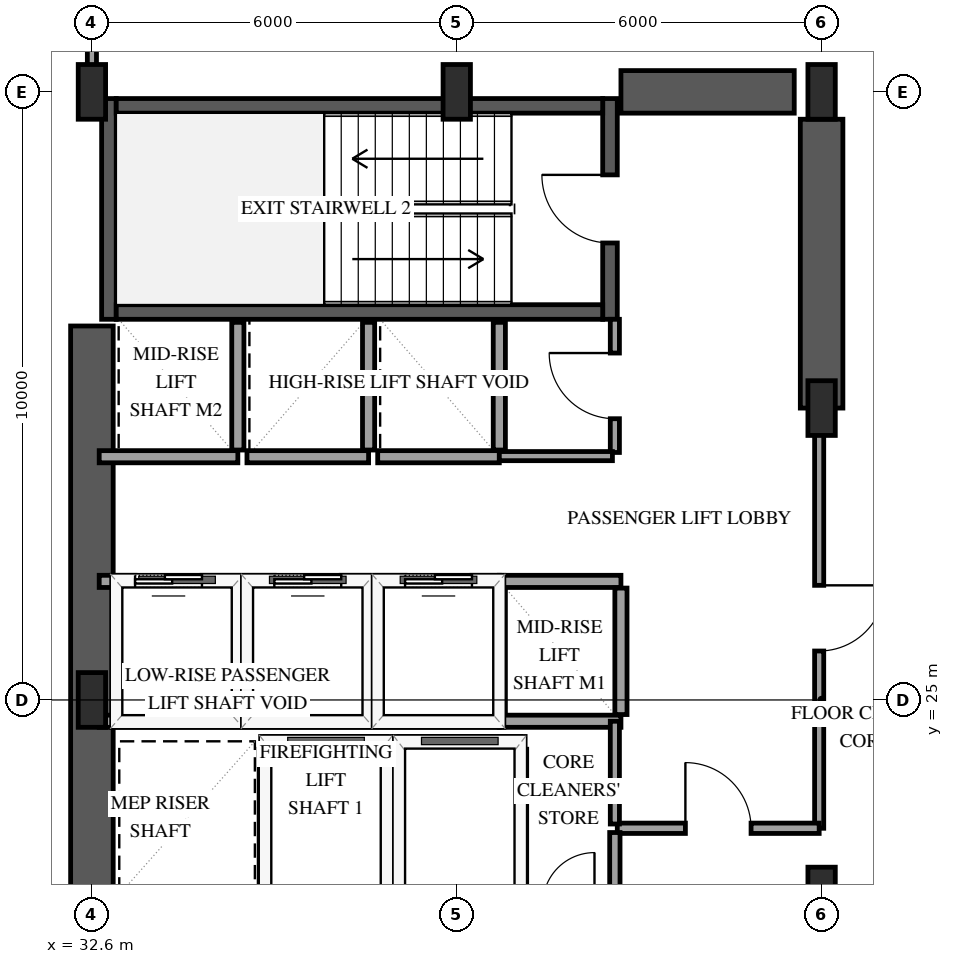
"""IFC4 building model, lengths in metres.
Left out: names, types, materials, properties, quantities, classifications, styles, units other than length and angle.
Written with IfcOpenShell. Run it as: python <this file> out.ifc"""

import sys

from ifc_helpers import new_model, si_unit, direction, frame, frame_2d, origin, origin_2d, place, context, subcontext, project, spatial, rectangle, extrude, element, fill, save


model = new_model("IFC4")
c1 = context("Model", 3, precision=1e-05, world=origin(), true_north=direction((0.0, 1.0)))
c2 = subcontext(c1, "Body", "Model", "MODEL_VIEW")
j1 = project(units=[si_unit("LENGTHUNIT", "METRE"), si_unit("PLANEANGLEUNIT", "RADIAN")], contexts=[c1])
p1 = place(None, origin())
s1 = spatial("IfcSite", under=j1, at=p1, CompositionType="ELEMENT")
p2 = place(p1, origin())
s2 = spatial("IfcBuilding", under=s1, at=p2, CompositionType="ELEMENT")
p3 = place(p2, frame((0.0, 0.0, 54.6)))
s3 = spatial("IfcBuildingStorey", under=s2, at=p3, CompositionType="ELEMENT", Elevation=54.6)
p4 = place(p3, frame((32.88, 31.26, 0.0), z_axis=(0.0, 0.0, 1.0), x_axis=(0.0, 1.0, 0.0)))
e1 = element("IfcWall", 1, at=p4, inside=s3, PredefinedType="SHEAR", context=c2, shape_type="SweptSolid", body=[
    extrude(rectangle(XDim=3.63, YDim=0.24, at=frame_2d((1.815, 0.0))), origin(), (0.0, 0.0, 1.0), 4.0),
])
p5 = place(p3, frame((41.12, 31.26, 0.0), z_axis=(0.0, 0.0, 1.0), x_axis=(0.0, 1.0, 0.0)))
e2 = element("IfcWall", 2, at=p5, inside=s3, PredefinedType="SHEAR", context=c2, shape_type="SweptSolid", body=[
    extrude(rectangle(XDim=3.63, YDim=0.24, at=frame_2d((1.815, 0.0))), origin(), (0.0, 0.0, 1.0), 4.0),
])
p6 = place(p5, frame((1.255, 0.0, 0.0)))
e3 = element("IfcOpeningElement", 3, at=p6, cuts=e2, PredefinedType="OPENING", context=c2, shape_type="SweptSolid", body=[
    extrude(rectangle(XDim=1.12, YDim=2.15, at=frame_2d((0.56, 1.075))), frame((0.0, 0.13, 0.0), z_axis=(0.0, -1.0, 0.0), x_axis=(1.0, 0.0, 0.0)), (0.0, 0.0, 1.0), 0.26),
])
for number, where, z_axis, x_axis in (
    (4, (33.0, 31.38, 0.0), (0.0, 0.0, 1.0), (1.0, 0.0, 0.0)),
    (5, (33.0, 34.77, 0.0), (0.0, 0.0, 1.0), (1.0, 0.0, 0.0)),
):
    element("IfcWall", number, at=place(p3, frame(where, z_axis=z_axis, x_axis=x_axis)), inside=s3, PredefinedType="SHEAR", context=c2, shape_type="SweptSolid", body=[
        extrude(rectangle(XDim=8.0, YDim=0.24, at=frame_2d((4.0, 0.0))), origin(), (0.0, 0.0, 1.0), 4.0),
    ])
p7 = place(p3, frame((32.6, 18.85, 0.0), z_axis=(0.0, 0.0, 1.0), x_axis=(0.0, 1.0, 0.0)))
e6 = element("IfcWall", 6, at=p7, inside=s3, PredefinedType="SHEAR", context=c2, shape_type="SweptSolid", body=[
    extrude(rectangle(XDim=12.3, YDim=0.7, at=frame_2d((6.15, 0.0))), origin(), (0.0, 0.0, 1.0), 4.0),
])
p8 = place(p3, frame((41.3, 35.0, 0.0), z_axis=(0.0, 0.0, 1.0), x_axis=(1.0, 0.0, 0.0)))
e7 = element("IfcWall", 7, at=p8, inside=s3, PredefinedType="SHEAR", context=c2, shape_type="SweptSolid", body=[
    extrude(rectangle(XDim=2.85, YDim=0.7, at=frame_2d((1.425, 0.0))), origin(), (0.0, 0.0, 1.0), 4.0),
])
p9 = place(p3, frame((44.6, 29.8, 0.0), z_axis=(0.0, 0.0, 1.0), x_axis=(0.0, 1.0, 0.0)))
e8 = element("IfcWall", 8, at=p9, inside=s3, PredefinedType="SHEAR", context=c2, shape_type="SweptSolid", body=[
    extrude(rectangle(XDim=4.75, YDim=0.7, at=frame_2d((2.375, 0.0))), origin(), (0.0, 0.0, 1.0), 4.0),
])
for number, where, z_axis, x_axis in (
    (9, (32.6, 25.0, 0.0), (0.0, 0.0, 1.0), (1.0, 0.0, 0.0)),
    (10, (32.6, 35.0, 0.0), (0.0, 0.0, 1.0), (1.0, 0.0, 0.0)),
    (11, (38.6, 35.0, 0.0), (0.0, 0.0, 1.0), (1.0, 0.0, 0.0)),
    (12, (44.6, 21.8, 0.0), (0.0, 0.0, 1.0), (1.0, 0.0, 0.0)),
    (13, (44.6, 29.8, 0.0), (0.0, 0.0, 1.0), (1.0, 0.0, 0.0)),
    (14, (44.6, 35.0, 0.0), (0.0, 0.0, 1.0), (1.0, 0.0, 0.0)),
):
    element("IfcColumn", number, at=place(p3, frame(where, z_axis=z_axis, x_axis=x_axis)), inside=s3, PredefinedType="PILASTER", context=c2, shape_type="SweptSolid", body=[
        extrude(rectangle(XDim=0.45, YDim=0.9, at=origin_2d()), origin(), (0.0, 0.0, 1.0), 4.0),
    ])
p10 = place(p3, frame((35.45, 24.3, 0.0), z_axis=(0.0, 0.0, 1.0), x_axis=(1.0, 0.0, 0.0)))
e15 = element("IfcWall", 15, at=p10, inside=s3, PredefinedType="SOLIDWALL", context=c2, shape_type="SweptSolid", body=[
    extrude(rectangle(XDim=2.0, YDim=0.2, at=frame_2d((1.0, 0.0))), origin(), (0.0, 0.0, 1.0), 3.7),
])
for number, where, z_axis, x_axis in (
    (16, (35.45, 21.81, 0.0), (0.0, 0.0, 1.0), (0.0, 1.0, 0.0)),
    (17, (37.45, 21.81, 0.0), (0.0, 0.0, 1.0), (0.0, 1.0, 0.0)),
):
    element("IfcWall", number, at=place(p3, frame(where, z_axis=z_axis, x_axis=x_axis)), inside=s3, PredefinedType="SOLIDWALL", context=c2, shape_type="SweptSolid", body=[
        extrude(rectangle(XDim=2.38, YDim=0.2, at=frame_2d((1.19, 0.0))), origin(), (0.0, 0.0, 1.0), 3.7),
    ])
p11 = place(p3, frame((37.65, 24.3, 0.0), z_axis=(0.0, 0.0, 1.0), x_axis=(1.0, 0.0, 0.0)))
e18 = element("IfcWall", 18, at=p11, inside=s3, PredefinedType="SOLIDWALL", context=c2, shape_type="SweptSolid", body=[
    extrude(rectangle(XDim=2.0, YDim=0.2, at=frame_2d((1.0, 0.0))), origin(), (0.0, 0.0, 1.0), 3.7),
])
p12 = place(p3, frame((39.65, 21.81, 0.0), z_axis=(0.0, 0.0, 1.0), x_axis=(0.0, 1.0, 0.0)))
e19 = element("IfcWall", 19, at=p12, inside=s3, PredefinedType="SOLIDWALL", context=c2, shape_type="SweptSolid", body=[
    extrude(rectangle(XDim=2.38, YDim=0.2, at=frame_2d((1.19, 0.0))), origin(), (0.0, 0.0, 1.0), 3.7),
])
p13 = place(p3, frame((32.72, 24.65, 0.0), z_axis=(0.0, 0.0, 1.0), x_axis=(1.0, 0.0, 0.0)))
e20 = element("IfcWall", 20, at=p13, inside=s3, PredefinedType="SOLIDWALL", context=c2, shape_type="SweptSolid", body=[
    extrude(rectangle(XDim=2.28, YDim=0.2, at=frame_2d((1.14, 0.0))), origin(), (0.0, 0.0, 1.0), 3.7),
])
p14 = place(p3, frame((32.72, 26.95, 0.0), z_axis=(0.0, 0.0, 1.0), x_axis=(1.0, 0.0, 0.0)))
e21 = element("IfcWall", 21, at=p14, inside=s3, PredefinedType="SOLIDWALL", context=c2, shape_type="SweptSolid", body=[
    extrude(rectangle(XDim=2.28, YDim=0.2, at=frame_2d((1.14, 0.0))), origin(), (0.0, 0.0, 1.0), 3.7),
])
p15 = place(p14, frame((0.59, 0.0, 0.0)))
e22 = element("IfcOpeningElement", 22, at=p15, cuts=e21, PredefinedType="OPENING", context=c2, shape_type="SweptSolid", body=[
    extrude(rectangle(XDim=1.1, YDim=2.15, at=frame_2d((0.55, 1.075))), frame((0.0, 0.11, 0.0), z_axis=(0.0, -1.0, 0.0), x_axis=(1.0, 0.0, 0.0)), (0.0, 0.0, 1.0), 0.22),
])
p16 = place(p3, frame((35.0, 24.76, 0.0), z_axis=(0.0, 0.0, 1.0), x_axis=(0.0, 1.0, 0.0)))
e23 = element("IfcWall", 23, at=p16, inside=s3, PredefinedType="SOLIDWALL", context=c2, shape_type="SweptSolid", body=[
    extrude(rectangle(XDim=2.08, YDim=0.2, at=frame_2d((1.04, 0.0))), origin(), (0.0, 0.0, 1.0), 3.7),
])
p17 = place(p3, frame((35.15, 24.65, 0.0), z_axis=(0.0, 0.0, 1.0), x_axis=(1.0, 0.0, 0.0)))
e24 = element("IfcWall", 24, at=p17, inside=s3, PredefinedType="SOLIDWALL", context=c2, shape_type="SweptSolid", body=[
    extrude(rectangle(XDim=2.0, YDim=0.2, at=frame_2d((1.0, 0.0))), origin(), (0.0, 0.0, 1.0), 3.7),
])
p18 = place(p3, frame((35.15, 26.95, 0.0), z_axis=(0.0, 0.0, 1.0), x_axis=(1.0, 0.0, 0.0)))
e25 = element("IfcWall", 25, at=p18, inside=s3, PredefinedType="SOLIDWALL", context=c2, shape_type="SweptSolid", body=[
    extrude(rectangle(XDim=2.0, YDim=0.2, at=frame_2d((1.0, 0.0))), origin(), (0.0, 0.0, 1.0), 3.7),
])
p19 = place(p18, frame((0.45, 0.0, 0.0)))
e26 = element("IfcOpeningElement", 26, at=p19, cuts=e25, PredefinedType="OPENING", context=c2, shape_type="SweptSolid", body=[
    extrude(rectangle(XDim=1.1, YDim=2.15, at=frame_2d((0.55, 1.075))), frame((0.0, 0.11, 0.0), z_axis=(0.0, -1.0, 0.0), x_axis=(1.0, 0.0, 0.0)), (0.0, 0.0, 1.0), 0.22),
])
p20 = place(p3, frame((37.15, 24.76, 0.0), z_axis=(0.0, 0.0, 1.0), x_axis=(0.0, 1.0, 0.0)))
e27 = element("IfcWall", 27, at=p20, inside=s3, PredefinedType="SOLIDWALL", context=c2, shape_type="SweptSolid", body=[
    extrude(rectangle(XDim=2.08, YDim=0.2, at=frame_2d((1.04, 0.0))), origin(), (0.0, 0.0, 1.0), 3.7),
])
p21 = place(p3, frame((37.3, 24.65, 0.0), z_axis=(0.0, 0.0, 1.0), x_axis=(1.0, 0.0, 0.0)))
e28 = element("IfcWall", 28, at=p21, inside=s3, PredefinedType="SOLIDWALL", context=c2, shape_type="SweptSolid", body=[
    extrude(rectangle(XDim=2.0, YDim=0.2, at=frame_2d((1.0, 0.0))), origin(), (0.0, 0.0, 1.0), 3.7),
])
p22 = place(p3, frame((37.3, 26.95, 0.0), z_axis=(0.0, 0.0, 1.0), x_axis=(1.0, 0.0, 0.0)))
e29 = element("IfcWall", 29, at=p22, inside=s3, PredefinedType="SOLIDWALL", context=c2, shape_type="SweptSolid", body=[
    extrude(rectangle(XDim=2.0, YDim=0.2, at=frame_2d((1.0, 0.0))), origin(), (0.0, 0.0, 1.0), 3.7),
])
p23 = place(p22, frame((0.45, 0.0, 0.0)))
e30 = element("IfcOpeningElement", 30, at=p23, cuts=e29, PredefinedType="OPENING", context=c2, shape_type="SweptSolid", body=[
    extrude(rectangle(XDim=1.1, YDim=2.15, at=frame_2d((0.55, 1.075))), frame((0.0, 0.11, 0.0), z_axis=(0.0, -1.0, 0.0), x_axis=(1.0, 0.0, 0.0)), (0.0, 0.0, 1.0), 0.22),
])
p24 = place(p3, frame((39.3, 24.76, 0.0), z_axis=(0.0, 0.0, 1.0), x_axis=(0.0, 1.0, 0.0)))
e31 = element("IfcWall", 31, at=p24, inside=s3, PredefinedType="SOLIDWALL", context=c2, shape_type="SweptSolid", body=[
    extrude(rectangle(XDim=2.08, YDim=0.2, at=frame_2d((1.04, 0.0))), origin(), (0.0, 0.0, 1.0), 3.7),
])
for number, where, z_axis, x_axis in (
    (32, (39.3, 24.65, 0.0), (0.0, 0.0, 1.0), (1.0, 0.0, 0.0)),
    (33, (39.3, 26.95, 0.0), (0.0, 0.0, 1.0), (1.0, 0.0, 0.0)),
):
    element("IfcWall", number, at=place(p3, frame(where, z_axis=z_axis, x_axis=x_axis)), inside=s3, PredefinedType="SOLIDWALL", context=c2, shape_type="SweptSolid", body=[
        extrude(rectangle(XDim=2.0, YDim=0.2, at=frame_2d((1.0, 0.0))), origin(), (0.0, 0.0, 1.0), 3.7),
    ])
p25 = place(p3, frame((41.3, 24.76, 0.0), z_axis=(0.0, 0.0, 1.0), x_axis=(0.0, 1.0, 0.0)))
e34 = element("IfcWall", 34, at=p25, inside=s3, PredefinedType="SOLIDWALL", context=c2, shape_type="SweptSolid", body=[
    extrude(rectangle(XDim=2.08, YDim=0.2, at=frame_2d((1.04, 0.0))), origin(), (0.0, 0.0, 1.0), 3.7),
])
p26 = place(p3, frame((32.72, 29.0, 0.0), z_axis=(0.0, 0.0, 1.0), x_axis=(1.0, 0.0, 0.0)))
e35 = element("IfcWall", 35, at=p26, inside=s3, PredefinedType="SOLIDWALL", context=c2, shape_type="SweptSolid", body=[
    extrude(rectangle(XDim=2.28, YDim=0.2, at=frame_2d((1.14, 0.0))), origin(), (0.0, 0.0, 1.0), 3.7),
])
p27 = place(p3, frame((35.0, 29.11, 0.0), z_axis=(0.0, 0.0, 1.0), x_axis=(0.0, 1.0, 0.0)))
e36 = element("IfcWall", 36, at=p27, inside=s3, PredefinedType="SOLIDWALL", context=c2, shape_type="SweptSolid", body=[
    extrude(rectangle(XDim=2.1, YDim=0.2, at=frame_2d((1.05, 0.0))), origin(), (0.0, 0.0, 1.0), 3.7),
])
p28 = place(p3, frame((35.15, 29.0, 0.0), z_axis=(0.0, 0.0, 1.0), x_axis=(1.0, 0.0, 0.0)))
e37 = element("IfcWall", 37, at=p28, inside=s3, PredefinedType="SOLIDWALL", context=c2, shape_type="SweptSolid", body=[
    extrude(rectangle(XDim=2.0, YDim=0.2, at=frame_2d((1.0, 0.0))), origin(), (0.0, 0.0, 1.0), 3.7),
])
p29 = place(p3, frame((37.15, 29.11, 0.0), z_axis=(0.0, 0.0, 1.0), x_axis=(0.0, 1.0, 0.0)))
e38 = element("IfcWall", 38, at=p29, inside=s3, PredefinedType="SOLIDWALL", context=c2, shape_type="SweptSolid", body=[
    extrude(rectangle(XDim=2.1, YDim=0.2, at=frame_2d((1.05, 0.0))), origin(), (0.0, 0.0, 1.0), 3.7),
])
p30 = place(p3, frame((37.3, 29.0, 0.0), z_axis=(0.0, 0.0, 1.0), x_axis=(1.0, 0.0, 0.0)))
e39 = element("IfcWall", 39, at=p30, inside=s3, PredefinedType="SOLIDWALL", context=c2, shape_type="SweptSolid", body=[
    extrude(rectangle(XDim=2.0, YDim=0.2, at=frame_2d((1.0, 0.0))), origin(), (0.0, 0.0, 1.0), 3.7),
])
p31 = place(p3, frame((39.3, 29.11, 0.0), z_axis=(0.0, 0.0, 1.0), x_axis=(0.0, 1.0, 0.0)))
e40 = element("IfcWall", 40, at=p31, inside=s3, PredefinedType="SOLIDWALL", context=c2, shape_type="SweptSolid", body=[
    extrude(rectangle(XDim=2.1, YDim=0.2, at=frame_2d((1.05, 0.0))), origin(), (0.0, 0.0, 1.0), 3.7),
])
p32 = place(p3, frame((44.56, 29.8, 0.0), z_axis=(0.0, 0.0, 1.0), x_axis=(0.0, -1.0, 0.0)))
e41 = element("IfcWall", 41, at=p32, inside=s3, PredefinedType="PARTITIONING", context=c2, shape_type="SweptSolid", body=[
    extrude(rectangle(XDim=6.91, YDim=0.15, at=frame_2d((3.455, 0.0))), origin(), (0.0, 0.0, 1.0), 2.74),
])
p33 = place(p32, frame((2.915, 0.0, 0.0)))
e42 = element("IfcOpeningElement", 42, at=p33, cuts=e41, PredefinedType="OPENING", context=c2, shape_type="SweptSolid", body=[
    extrude(rectangle(XDim=1.08, YDim=2.15, at=frame_2d((0.54, 1.075))), frame((0.0, 0.085, 0.0), z_axis=(0.0, -1.0, 0.0), x_axis=(1.0, 0.0, 0.0)), (0.0, 0.0, 1.0), 0.17),
])
p34 = place(p3, frame((41.24, 22.89, 0.0), z_axis=(0.0, 0.0, 1.0), x_axis=(1.0, 0.0, 0.0)))
e43 = element("IfcWall", 43, at=p34, inside=s3, PredefinedType="PARTITIONING", context=c2, shape_type="SweptSolid", body=[
    extrude(rectangle(XDim=3.32, YDim=0.17, at=frame_2d((1.66, 0.0))), origin(), (0.0, 0.0, 1.0), 3.7),
])
p35 = place(p34, frame((1.12, 0.0, 0.0)))
e44 = element("IfcOpeningElement", 44, at=p35, cuts=e43, PredefinedType="OPENING", context=c2, shape_type="SweptSolid", body=[
    extrude(rectangle(XDim=1.08, YDim=2.15, at=frame_2d((0.54, 1.075))), frame((0.0, 0.095, 0.0), z_axis=(0.0, -1.0, 0.0), x_axis=(1.0, 0.0, 0.0)), (0.0, 0.0, 1.0), 0.19),
])
p36 = place(p3, frame((41.2, 29.07, 0.0), z_axis=(0.0, 0.0, 1.0), x_axis=(0.0, 1.0, 0.0)))
e45 = element("IfcWall", 45, at=p36, inside=s3, PredefinedType="PARTITIONING", context=c2, shape_type="SweptSolid", body=[
    extrude(rectangle(XDim=2.19, YDim=0.15, at=frame_2d((1.095, 0.0))), origin(), (0.0, 0.0, 1.0), 3.7),
])
p37 = place(p36, frame((0.555, 0.0, 0.0)))
e46 = element("IfcOpeningElement", 46, at=p37, cuts=e45, PredefinedType="OPENING", context=c2, shape_type="SweptSolid", body=[
    extrude(rectangle(XDim=1.08, YDim=2.15, at=frame_2d((0.54, 1.075))), frame((0.0, 0.085, 0.0), z_axis=(0.0, -1.0, 0.0), x_axis=(1.0, 0.0, 0.0)), (0.0, 0.0, 1.0), 0.17),
])
p38 = place(p3, frame((32.6, 35.07, 0.0), z_axis=(0.0, 0.0, 1.0), x_axis=(0.0, 1.0, 0.0)))
e47 = element("IfcWall", 47, at=p38, inside=s3, PredefinedType="PARTITIONING", context=c2, shape_type="SweptSolid", body=[
    extrude(rectangle(XDim=1.91, YDim=0.15, at=frame_2d((0.955, 0.0))), origin(), (0.0, 0.0, 1.0), 3.7),
])
p39 = place(p3, frame((39.3, 29.01, 0.0), z_axis=(0.0, 0.0, 1.0), x_axis=(1.0, 0.0, 0.0)))
e48 = element("IfcWall", 48, at=p39, inside=s3, PredefinedType="PARTITIONING", context=c2, shape_type="SweptSolid", body=[
    extrude(rectangle(XDim=1.86, YDim=0.15, at=frame_2d((0.93, 0.0))), origin(), (0.0, 0.0, 1.0), 3.7),
])
p40 = place(p3, frame((41.2, 22.96, 0.0), z_axis=(0.0, 0.0, 1.0), x_axis=(0.0, 1.0, 0.0)))
e49 = element("IfcWall", 49, at=p40, inside=s3, PredefinedType="PARTITIONING", context=c2, shape_type="SweptSolid", body=[
    extrude(rectangle(XDim=1.69, YDim=0.15, at=frame_2d((0.845, 0.0))), origin(), (0.0, 0.0, 1.0), 3.7),
])
p41 = place(p3, frame((41.2, 21.7, 0.0), z_axis=(0.0, 0.0, 1.0), x_axis=(0.0, 1.0, 0.0)))
e50 = element("IfcWall", 50, at=p41, inside=s3, PredefinedType="PARTITIONING", context=c2, shape_type="SweptSolid", body=[
    extrude(rectangle(XDim=1.12, YDim=0.17, at=frame_2d((0.56, 0.0))), origin(), (0.0, 0.0, 1.0), 3.7),
])
p42 = place(p15, origin())
e51 = element("IfcDoor", 51, at=p42, inside=s3, OperationType="SLIDING_TO_LEFT", PredefinedType="DOOR", context=c2, shape_type="SweptSolid", body=[
    extrude(rectangle(XDim=1.1, YDim=2.15, at=frame_2d((0.55, 1.075))), frame((0.0, 0.025, 0.0), z_axis=(0.0, -1.0, 0.0), x_axis=(1.0, 0.0, 0.0)), (0.0, 0.0, 1.0), 0.05),
])
fill(e22, e51)
p43 = place(p19, origin())
e52 = element("IfcDoor", 52, at=p43, inside=s3, OperationType="SLIDING_TO_LEFT", PredefinedType="DOOR", context=c2, shape_type="SweptSolid", body=[
    extrude(rectangle(XDim=1.1, YDim=2.15, at=frame_2d((0.55, 1.075))), frame((0.0, 0.025, 0.0), z_axis=(0.0, -1.0, 0.0), x_axis=(1.0, 0.0, 0.0)), (0.0, 0.0, 1.0), 0.05),
])
fill(e26, e52)
p44 = place(p23, origin())
e53 = element("IfcDoor", 53, at=p44, inside=s3, OperationType="SLIDING_TO_LEFT", PredefinedType="DOOR", context=c2, shape_type="SweptSolid", body=[
    extrude(rectangle(XDim=1.1, YDim=2.15, at=frame_2d((0.55, 1.075))), frame((0.0, 0.025, 0.0), z_axis=(0.0, -1.0, 0.0), x_axis=(1.0, 0.0, 0.0)), (0.0, 0.0, 1.0), 0.05),
])
fill(e30, e53)
p45 = place(p6, origin())
e54 = element("IfcDoor", 54, at=p45, inside=s3, OperationType="SINGLE_SWING_RIGHT", PredefinedType="DOOR", context=c2, shape_type="SweptSolid", body=[
    extrude(rectangle(XDim=1.12, YDim=2.15, at=frame_2d((0.56, 1.075))), frame((0.0, 0.025, 0.0), z_axis=(0.0, -1.0, 0.0), x_axis=(1.0, 0.0, 0.0)), (0.0, 0.0, 1.0), 0.05),
])
fill(e3, e54)
p46 = place(p33, origin())
e55 = element("IfcDoor", 55, at=p46, inside=s3, OperationType="SINGLE_SWING_LEFT", PredefinedType="DOOR", context=c2, shape_type="SweptSolid", body=[
    extrude(rectangle(XDim=1.08, YDim=2.15, at=frame_2d((0.54, 1.075))), frame((0.0, 0.025, 0.0), z_axis=(0.0, -1.0, 0.0), x_axis=(1.0, 0.0, 0.0)), (0.0, 0.0, 1.0), 0.05),
])
fill(e42, e55)
p47 = place(p35, origin())
e56 = element("IfcDoor", 56, at=p47, inside=s3, OperationType="SINGLE_SWING_LEFT", PredefinedType="DOOR", context=c2, shape_type="SweptSolid", body=[
    extrude(rectangle(XDim=1.08, YDim=2.15, at=frame_2d((0.54, 1.075))), frame((0.0, 0.025, 0.0), z_axis=(0.0, -1.0, 0.0), x_axis=(1.0, 0.0, 0.0)), (0.0, 0.0, 1.0), 0.05),
])
fill(e44, e56)
p48 = place(p37, origin())
e57 = element("IfcDoor", 57, at=p48, inside=s3, OperationType="SINGLE_SWING_RIGHT", PredefinedType="DOOR", context=c2, shape_type="SweptSolid", body=[
    extrude(rectangle(XDim=1.08, YDim=2.15, at=frame_2d((0.54, 1.075))), frame((0.0, 0.025, 0.0), z_axis=(0.0, -1.0, 0.0), x_axis=(1.0, 0.0, 0.0)), (0.0, 0.0, 1.0), 0.05),
])
fill(e46, e57)
save(model, sys.argv[1])
